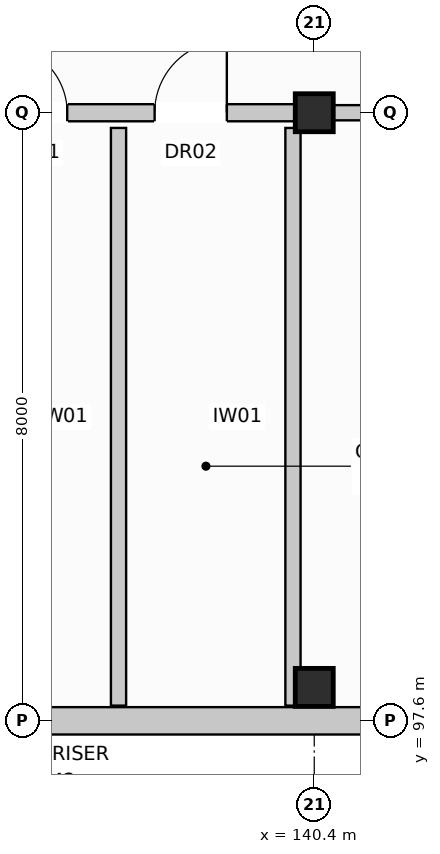
"""IFC4 building model, lengths in metres.
Left out: names, types, materials, properties, quantities, classifications, styles, units other than length and angle.
Written with IfcOpenShell. Run it as: python <this file> out.ifc"""

import sys

from ifc_helpers import new_model, si_unit, direction, frame, frame_2d, origin, origin_with_axes, origin_2d, place, context, subcontext, project, spatial, rectangle, extrude, element, fill, save


model = new_model("IFC4")
c1 = context("Model", 3, precision=1e-05, world=origin(), true_north=direction((0.0, 1.0)))
c2 = subcontext(c1, "Body", "Model", "MODEL_VIEW")
j1 = project(units=[si_unit("LENGTHUNIT", "METRE"), si_unit("PLANEANGLEUNIT", "RADIAN")], contexts=[c1])
p1 = place(None, origin())
s1 = spatial("IfcSite", under=j1, at=p1, CompositionType="ELEMENT")
p2 = place(p1, origin())
s2 = spatial("IfcBuilding", under=s1, at=p2, CompositionType="ELEMENT")
p3 = place(p2, frame((0.0, 0.0, 8.0)))
s3 = spatial("IfcBuildingStorey", under=s2, at=p3, CompositionType="ELEMENT", Elevation=8.0)
for number, where, z_axis, x_axis in (
    (1, (140.4, 98.04, 0.0), (0.0, 0.0, 1.0), (1.0, 0.0, 0.0)),
    (2, (140.4, 105.6, 0.0), (0.0, 0.0, 1.0), (1.0, 0.0, 0.0)),
):
    element("IfcColumn", number, at=place(p3, frame(where, z_axis=z_axis, x_axis=x_axis)), inside=s3, PredefinedType="COLUMN", context=c2, shape_type="SweptSolid", body=[
        extrude(rectangle(XDim=0.5, YDim=0.5, at=origin_2d()), origin(), (0.0, 0.0, 1.0), 3.2),
    ])
p4 = place(p3, frame((130.35, 97.6, 0.0), z_axis=(0.0, 0.0, 1.0), x_axis=(1.0, 0.0, 0.0)))
e3 = element("IfcWall", 3, at=p4, inside=s3, PredefinedType="STANDARD", context=c2, shape_type="SweptSolid", body=[
    extrude(rectangle(XDim=17.4, YDim=0.36, at=frame_2d((8.7, 0.0))), origin(), (0.0, 0.0, 1.0), 2.94),
])
p5 = place(p4, frame((11.812, 0.0, 0.0)))
e4 = element("IfcOpeningElement", 4, at=p5, cuts=e3, PredefinedType="OPENING", context=c2, shape_type="SweptSolid", body=[
    extrude(rectangle(XDim=1.05, YDim=2.12, at=frame_2d((0.525, 1.06))), frame((0.0, 0.192, 0.0), z_axis=(0.0, -1.0, 0.0), x_axis=(1.0, 0.0, 0.0)), (0.0, 0.0, 1.0), 0.384),
])
p6 = place(p4, frame((14.87, 0.0, 0.72)))
e5 = element("IfcOpeningElement", 5, at=p6, cuts=e3, PredefinedType="OPENING", context=c2, shape_type="SweptSolid", body=[
    extrude(rectangle(XDim=1.1, YDim=1.5, at=frame_2d((0.55, 0.75))), frame((0.0, 0.192, 0.0), z_axis=(0.0, -1.0, 0.0), x_axis=(1.0, 0.0, 0.0)), (0.0, 0.0, 1.0), 0.384),
])
for number, where, z_axis, x_axis in (
    (6, (137.825, 97.8, 0.0), (0.0, 0.0, 1.0), (0.0, 1.0, 0.0)),
    (7, (140.12, 97.8, 0.0), (0.0, 0.0, 1.0), (0.0, 1.0, 0.0)),
):
    element("IfcWall", number, at=place(p3, frame(where, z_axis=z_axis, x_axis=x_axis)), inside=s3, PredefinedType="PARTITIONING", context=c2, shape_type="SweptSolid", body=[
        extrude(rectangle(XDim=7.6, YDim=0.2, at=frame_2d((3.8, 0.0))), origin(), (0.0, 0.0, 1.0), 2.94),
    ])
p7 = place(p3, frame((130.5, 105.6, 0.0), z_axis=(0.0, 0.0, 1.0), x_axis=(1.0, 0.0, 0.0)))
e8 = element("IfcWall", 8, at=p7, inside=s3, PredefinedType="PARTITIONING", context=c2, shape_type="SweptSolid", body=[
    extrude(rectangle(XDim=9.9, YDim=0.225, at=frame_2d((4.95, 0.0))), origin(), (0.0, 0.0, 1.0), 2.38),
])
p8 = place(p7, frame((0.475, 0.0, 0.0)))
e9 = element("IfcOpeningElement", 9, at=p8, cuts=e8, PredefinedType="OPENING", context=c2, shape_type="SweptSolid", body=[
    extrude(rectangle(XDim=1.1, YDim=2.15, at=frame_2d((0.55, 1.075))), frame((0.0, 0.125, 0.0), z_axis=(0.0, -1.0, 0.0), x_axis=(1.0, 0.0, 0.0)), (0.0, 0.0, 1.0), 0.249),
])
p9 = place(p7, frame((5.75, 0.0, 0.0)))
e10 = element("IfcOpeningElement", 10, at=p9, cuts=e8, PredefinedType="OPENING", context=c2, shape_type="SweptSolid", body=[
    extrude(rectangle(XDim=0.9, YDim=2.1, at=frame_2d((0.45, 1.05))), frame((0.0, 0.125, 0.0), z_axis=(0.0, -1.0, 0.0), x_axis=(1.0, 0.0, 0.0)), (0.0, 0.0, 1.0), 0.249),
])
p10 = place(p7, frame((7.8, 0.0, 0.0)))
e11 = element("IfcOpeningElement", 11, at=p10, cuts=e8, PredefinedType="OPENING", context=c2, shape_type="SweptSolid", body=[
    extrude(rectangle(XDim=0.95, YDim=2.15, at=frame_2d((0.475, 1.075))), frame((0.0, 0.125, 0.0), z_axis=(0.0, -1.0, 0.0), x_axis=(1.0, 0.0, 0.0)), (0.0, 0.0, 1.0), 0.249),
])
p11 = place(p3, frame((140.4, 105.6, 0.0), z_axis=(0.0, 0.0, 1.0), x_axis=(1.0, 0.0, 0.0)))
e12 = element("IfcWall", 12, at=p11, inside=s3, PredefinedType="PARTITIONING", context=c2, shape_type="SweptSolid", body=[
    extrude(rectangle(XDim=6.9, YDim=0.2, at=frame_2d((3.45, 0.0))), origin(), (0.0, 0.0, 1.0), 2.38),
])
p12 = place(p11, frame((2.0, 0.0, 0.0)))
e13 = element("IfcOpeningElement", 13, at=p12, cuts=e12, PredefinedType="OPENING", context=c2, shape_type="SweptSolid", body=[
    extrude(rectangle(XDim=0.95, YDim=2.15, at=frame_2d((0.475, 1.075))), frame((0.0, 0.112, 0.0), z_axis=(0.0, -1.0, 0.0), x_axis=(1.0, 0.0, 0.0)), (0.0, 0.0, 1.0), 0.224),
])
p13 = place(p9, origin_with_axes())
e14 = element("IfcDoor", 14, at=p13, inside=s3, OperationType="SINGLE_SWING_LEFT", PredefinedType="DOOR", context=c2, shape_type="SweptSolid", body=[
    extrude(rectangle(XDim=0.9, YDim=2.1, at=frame_2d((0.45, 1.05))), frame((0.0, 0.025, 0.0), z_axis=(0.0, -1.0, 0.0), x_axis=(1.0, 0.0, 0.0)), (0.0, 0.0, 1.0), 0.05),
])
fill(e10, e14)
p14 = place(p10, origin_with_axes())
e15 = element("IfcDoor", 15, at=p14, inside=s3, OperationType="SINGLE_SWING_RIGHT", PredefinedType="DOOR", context=c2, shape_type="SweptSolid", body=[
    extrude(rectangle(XDim=0.95, YDim=2.15, at=frame_2d((0.475, 1.075))), frame((0.0, 0.025, 0.0), z_axis=(0.0, -1.0, 0.0), x_axis=(1.0, 0.0, 0.0)), (0.0, 0.0, 1.0), 0.05),
])
fill(e11, e15)
save(model, sys.argv[1])
